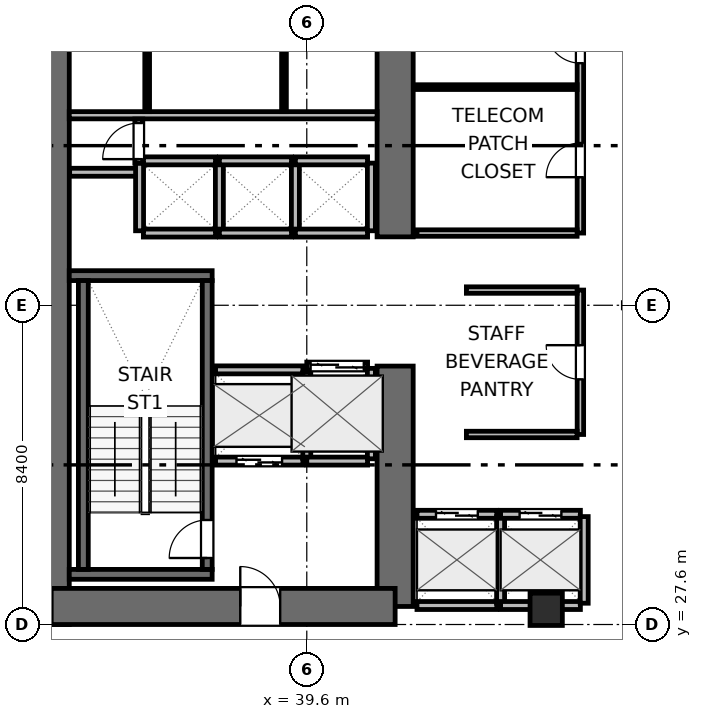
"""IFC4 building model, lengths in metres.
Left out: names, types, materials, properties, quantities, classifications, styles, units other than length and angle.
Written with IfcOpenShell. Run it as: python <this file> out.ifc"""

import sys

from ifc_helpers import new_model, si_unit, direction, frame, frame_2d, origin, origin_2d, place, context, subcontext, project, spatial, rectangle, extrude, element, fill, save


model = new_model("IFC4")
c1 = context("Model", 3, precision=1e-05, world=origin(), true_north=direction((0.0, 1.0)))
c2 = subcontext(c1, "Body", "Model", "MODEL_VIEW")
j1 = project(units=[si_unit("LENGTHUNIT", "METRE"), si_unit("PLANEANGLEUNIT", "RADIAN")], contexts=[c1])
p1 = place(None, origin())
s1 = spatial("IfcSite", under=j1, at=p1, CompositionType="ELEMENT")
p2 = place(p1, origin())
s2 = spatial("IfcBuilding", under=s1, at=p2, CompositionType="ELEMENT")
p3 = place(p2, frame((0.0, 0.0, 21.6)))
s3 = spatial("IfcBuildingStorey", under=s2, at=p3, CompositionType="ELEMENT", Elevation=21.6)
p4 = place(p3, frame((32.875, 27.6, 0.0), z_axis=(0.0, 0.0, 1.0), x_axis=(0.0, 1.0, 0.0)))
e1 = element("IfcWall", 1, at=p4, inside=s3, PredefinedType="SHEAR", context=c2, shape_type="SweptSolid", body=[
    extrude(rectangle(XDim=16.8, YDim=0.95, at=frame_2d((8.4, 0.0))), origin(), (0.0, 0.0, 1.0), 3.9),
])
p5 = place(p3, frame((41.925, 28.075, 0.0), z_axis=(0.0, 0.0, 1.0), x_axis=(0.0, 1.0, 0.0)))
e2 = element("IfcWall", 2, at=p5, inside=s3, PredefinedType="SHEAR", context=c2, shape_type="SweptSolid", body=[
    extrude(rectangle(XDim=6.325, YDim=0.95, at=frame_2d((3.163, 0.0))), origin(), (0.0, 0.0, 1.0), 3.9),
])
p6 = place(p3, frame((41.925, 37.8, 0.0), z_axis=(0.0, 0.0, 1.0), x_axis=(0.0, 1.0, 0.0)))
e3 = element("IfcWall", 3, at=p6, inside=s3, PredefinedType="SHEAR", context=c2, shape_type="SweptSolid", body=[
    extrude(rectangle(XDim=6.125, YDim=0.95, at=frame_2d((3.062, 0.0))), origin(), (0.0, 0.0, 1.0), 3.9),
])
p7 = place(p3, frame((32.875, 28.075, 0.0), z_axis=(0.0, 0.0, 1.0), x_axis=(1.0, 0.0, 0.0)))
e4 = element("IfcWall", 4, at=p7, inside=s3, PredefinedType="SHEAR", context=c2, shape_type="SweptSolid", body=[
    extrude(rectangle(XDim=9.05, YDim=0.95, at=frame_2d((4.525, 0.0))), origin(), (0.0, 0.0, 1.0), 3.9),
])
p8 = place(p7, frame((4.975, 0.0, 0.0)))
e5 = element("IfcOpeningElement", 5, at=p8, cuts=e4, PredefinedType="OPENING", context=c2, shape_type="SweptSolid", body=[
    extrude(rectangle(XDim=1.05, YDim=2.04, at=frame_2d((0.525, 1.02))), frame((0.0, 0.485, 0.0), z_axis=(0.0, -1.0, 0.0), x_axis=(1.0, 0.0, 0.0)), (0.0, 0.0, 1.0), 0.97),
])
for number, where, z_axis, x_axis in (
    (6, (33.35, 28.92, 0.0), (0.0, 0.0, 1.0), (1.0, 0.0, 0.0)),
    (7, (33.35, 36.78, 0.0), (0.0, 0.0, 1.0), (1.0, 0.0, 0.0)),
):
    element("IfcWall", number, at=place(p3, frame(where, z_axis=z_axis, x_axis=x_axis)), inside=s3, PredefinedType="SHEAR", context=c2, shape_type="SweptSolid", body=[
        extrude(rectangle(XDim=3.76, YDim=0.26, at=frame_2d((1.88, 0.0))), origin(), (0.0, 0.0, 1.0), 3.9),
    ])
p9 = place(p3, frame((33.72, 29.05, 0.0), z_axis=(0.0, 0.0, 1.0), x_axis=(0.0, 1.0, 0.0)))
e8 = element("IfcWall", 8, at=p9, inside=s3, PredefinedType="SHEAR", context=c2, shape_type="SweptSolid", body=[
    extrude(rectangle(XDim=7.6, YDim=0.26, at=frame_2d((3.8, 0.0))), origin(), (0.0, 0.0, 1.0), 3.9),
])
p10 = place(p3, frame((36.98, 29.05, 0.0), z_axis=(0.0, 0.0, 1.0), x_axis=(0.0, 1.0, 0.0)))
e9 = element("IfcWall", 9, at=p10, inside=s3, PredefinedType="SHEAR", context=c2, shape_type="SweptSolid", body=[
    extrude(rectangle(XDim=7.6, YDim=0.26, at=frame_2d((3.8, 0.0))), origin(), (0.0, 0.0, 1.0), 3.9),
])
p11 = place(p10, frame((0.3, 0.0, 0.0)))
e10 = element("IfcOpeningElement", 10, at=p11, cuts=e9, PredefinedType="OPENING", context=c2, shape_type="SweptSolid", body=[
    extrude(rectangle(XDim=1.0, YDim=2.04, at=frame_2d((0.5, 1.02))), frame((0.0, 0.14, 0.0), z_axis=(0.0, -1.0, 0.0), x_axis=(1.0, 0.0, 0.0)), (0.0, 0.0, 1.0), 0.28),
])
p12 = place(p3, frame((45.9, 28.0, 0.0), z_axis=(0.0, 0.0, 1.0), x_axis=(1.0, 0.0, 0.0)))
e11 = element("IfcColumn", 11, at=p12, inside=s3, PredefinedType="COLUMN", context=c2, shape_type="SweptSolid", body=[
    extrude(rectangle(XDim=0.85, YDim=0.85, at=origin_2d()), origin(), (0.0, 0.0, 1.0), 3.9),
])
p13 = place(p3, frame((33.35, 41.0, 0.0), z_axis=(0.0, 0.0, 1.0), x_axis=(1.0, 0.0, 0.0)))
e12 = element("IfcWall", 12, at=p13, inside=s3, PredefinedType="PLUMBINGWALL", context=c2, shape_type="SweptSolid", body=[
    extrude(rectangle(XDim=8.1, YDim=0.19, at=frame_2d((4.05, 0.0))), origin(), (0.0, 0.0, 1.0), 3.64),
])
for number, where, z_axis, x_axis in (
    (13, (35.4, 41.095, 0.0), (0.0, 0.0, 1.0), (0.0, 1.0, 0.0)),
    (14, (39.0, 41.095, 0.0), (0.0, 0.0, 1.0), (0.0, 1.0, 0.0)),
):
    element("IfcWall", number, at=place(p3, frame(where, z_axis=z_axis, x_axis=x_axis)), inside=s3, PredefinedType="PARTITIONING", context=c2, shape_type="SweptSolid", body=[
        extrude(rectangle(XDim=2.355, YDim=0.125, at=frame_2d((1.177, 0.0))), origin(), (0.0, 0.0, 1.0), 3.64),
    ])
p14 = place(p3, frame((33.36, 39.5, 0.0), z_axis=(0.0, 0.0, 1.0), x_axis=(1.0, 0.0, 0.0)))
e15 = element("IfcWall", 15, at=p14, inside=s3, PredefinedType="PARTITIONING", context=c2, shape_type="SweptSolid", body=[
    extrude(rectangle(XDim=1.86, YDim=0.21, at=frame_2d((0.93, 0.0))), origin(), (0.0, 0.0, 1.0), 3.64),
])
p15 = place(p3, frame((37.2, 31.9, 0.0), z_axis=(0.0, 0.0, 1.0), x_axis=(1.0, 0.0, 0.0)))
e16 = element("IfcWall", 16, at=p15, inside=s3, PredefinedType="PARTITIONING", context=c2, shape_type="SweptSolid", body=[
    extrude(rectangle(XDim=2.3, YDim=0.21, at=frame_2d((1.15, 0.0))), origin(), (0.0, 0.0, 1.0), 3.64),
])
p16 = place(p15, frame((0.55, 0.0, 0.0)))
e17 = element("IfcOpeningElement", 17, at=p16, cuts=e16, PredefinedType="OPENING", context=c2, shape_type="SweptSolid", body=[
    extrude(rectangle(XDim=1.2, YDim=2.04, at=frame_2d((0.6, 1.02))), frame((0.0, 0.115, 0.0), z_axis=(0.0, -1.0, 0.0), x_axis=(1.0, 0.0, 0.0)), (0.0, 0.0, 1.0), 0.23),
])
p17 = place(p3, frame((37.2, 34.3, 0.0), z_axis=(0.0, 0.0, 1.0), x_axis=(1.0, 0.0, 0.0)))
e18 = element("IfcWall", 18, at=p17, inside=s3, PredefinedType="PARTITIONING", context=c2, shape_type="SweptSolid", body=[
    extrude(rectangle(XDim=2.3, YDim=0.21, at=frame_2d((1.15, 0.0))), origin(), (0.0, 0.0, 1.0), 3.64),
])
p18 = place(p3, frame((39.6, 31.96, 0.0), z_axis=(0.0, 0.0, 1.0), x_axis=(0.0, 1.0, 0.0)))
e19 = element("IfcWall", 19, at=p18, inside=s3, PredefinedType="PARTITIONING", context=c2, shape_type="SweptSolid", body=[
    extrude(rectangle(XDim=2.28, YDim=0.21, at=frame_2d((1.14, 0.0))), origin(), (0.0, 0.0, 1.0), 3.64),
])
p19 = place(p3, frame((39.6, 34.4, 0.0), z_axis=(0.0, 0.0, 1.0), x_axis=(1.0, 0.0, 0.0)))
e20 = element("IfcWall", 20, at=p19, inside=s3, PredefinedType="PARTITIONING", context=c2, shape_type="SweptSolid", body=[
    extrude(rectangle(XDim=1.6, YDim=0.21, at=frame_2d((0.8, 0.0))), origin(), (0.0, 0.0, 1.0), 3.64),
])
p20 = place(p19, frame((0.1, 0.0, 0.0)))
e21 = element("IfcOpeningElement", 21, at=p20, cuts=e20, PredefinedType="OPENING", context=c2, shape_type="SweptSolid", body=[
    extrude(rectangle(XDim=1.4, YDim=2.06, at=frame_2d((0.7, 1.03))), frame((0.0, 0.115, 0.0), z_axis=(0.0, -1.0, 0.0), x_axis=(1.0, 0.0, 0.0)), (0.0, 0.0, 1.0), 0.23),
])
p21 = place(p3, frame((39.6, 31.9, 0.0), z_axis=(0.0, 0.0, 1.0), x_axis=(1.0, 0.0, 0.0)))
e22 = element("IfcWall", 22, at=p21, inside=s3, PredefinedType="PARTITIONING", context=c2, shape_type="SweptSolid", body=[
    extrude(rectangle(XDim=1.6, YDim=0.21, at=frame_2d((0.8, 0.0))), origin(), (0.0, 0.0, 1.0), 3.64),
])
p22 = place(p3, frame((41.3, 31.96, 0.0), z_axis=(0.0, 0.0, 1.0), x_axis=(0.0, 1.0, 0.0)))
e23 = element("IfcWall", 23, at=p22, inside=s3, PredefinedType="PARTITIONING", context=c2, shape_type="SweptSolid", body=[
    extrude(rectangle(XDim=2.38, YDim=0.21, at=frame_2d((1.19, 0.0))), origin(), (0.0, 0.0, 1.0), 3.64),
])
p23 = place(p3, frame((42.5, 30.5, 0.0), z_axis=(0.0, 0.0, 1.0), x_axis=(1.0, 0.0, 0.0)))
e24 = element("IfcWall", 24, at=p23, inside=s3, PredefinedType="PARTITIONING", context=c2, shape_type="SweptSolid", body=[
    extrude(rectangle(XDim=2.1, YDim=0.21, at=frame_2d((1.05, 0.0))), origin(), (0.0, 0.0, 1.0), 3.64),
])
p24 = place(p23, frame((0.5, 0.0, 0.0)))
e25 = element("IfcOpeningElement", 25, at=p24, cuts=e24, PredefinedType="OPENING", context=c2, shape_type="SweptSolid", body=[
    extrude(rectangle(XDim=1.1, YDim=2.04, at=frame_2d((0.55, 1.02))), frame((0.0, 0.115, 0.0), z_axis=(0.0, -1.0, 0.0), x_axis=(1.0, 0.0, 0.0)), (0.0, 0.0, 1.0), 0.23),
])
p25 = place(p3, frame((42.5, 28.1, 0.0), z_axis=(0.0, 0.0, 1.0), x_axis=(1.0, 0.0, 0.0)))
e26 = element("IfcWall", 26, at=p25, inside=s3, PredefinedType="PARTITIONING", context=c2, shape_type="SweptSolid", body=[
    extrude(rectangle(XDim=2.1, YDim=0.21, at=frame_2d((1.05, 0.0))), origin(), (0.0, 0.0, 1.0), 2.525),
])
p26 = place(p3, frame((44.7, 28.16, 0.0), z_axis=(0.0, 0.0, 1.0), x_axis=(0.0, 1.0, 0.0)))
e27 = element("IfcWall", 27, at=p26, inside=s3, PredefinedType="PARTITIONING", context=c2, shape_type="SweptSolid", body=[
    extrude(rectangle(XDim=2.28, YDim=0.21, at=frame_2d((1.14, 0.0))), origin(), (0.0, 0.0, 1.0), 3.64),
])
p27 = place(p3, frame((44.7, 30.5, 0.0), z_axis=(0.0, 0.0, 1.0), x_axis=(1.0, 0.0, 0.0)))
e28 = element("IfcWall", 28, at=p27, inside=s3, PredefinedType="PARTITIONING", context=c2, shape_type="SweptSolid", body=[
    extrude(rectangle(XDim=2.1, YDim=0.21, at=frame_2d((1.05, 0.0))), origin(), (0.0, 0.0, 1.0), 3.64),
])
p28 = place(p27, frame((0.5, 0.0, 0.0)))
e29 = element("IfcOpeningElement", 29, at=p28, cuts=e28, PredefinedType="OPENING", context=c2, shape_type="SweptSolid", body=[
    extrude(rectangle(XDim=1.1, YDim=2.04, at=frame_2d((0.55, 1.02))), frame((0.0, 0.115, 0.0), z_axis=(0.0, -1.0, 0.0), x_axis=(1.0, 0.0, 0.0)), (0.0, 0.0, 1.0), 0.23),
])
p29 = place(p3, frame((44.7, 28.1, 0.0), z_axis=(0.0, 0.0, 1.0), x_axis=(1.0, 0.0, 0.0)))
e30 = element("IfcWall", 30, at=p29, inside=s3, PredefinedType="PARTITIONING", context=c2, shape_type="SweptSolid", body=[
    extrude(rectangle(XDim=2.1, YDim=0.21, at=frame_2d((1.05, 0.0))), origin(), (0.0, 0.0, 1.0), 2.525),
])
p30 = place(p3, frame((46.9, 28.16, 0.0), z_axis=(0.0, 0.0, 1.0), x_axis=(0.0, 1.0, 0.0)))
e31 = element("IfcWall", 31, at=p30, inside=s3, PredefinedType="PARTITIONING", context=c2, shape_type="SweptSolid", body=[
    extrude(rectangle(XDim=2.28, YDim=0.21, at=frame_2d((1.14, 0.0))), origin(), (0.0, 0.0, 1.0), 3.64),
])
for number, where, z_axis, x_axis in (
    (32, (35.3, 37.9, 0.0), (0.0, 0.0, 1.0), (1.0, 0.0, 0.0)),
    (33, (35.3, 39.8, 0.0), (0.0, 0.0, 1.0), (1.0, 0.0, 0.0)),
):
    element("IfcWall", number, at=place(p3, frame(where, z_axis=z_axis, x_axis=x_axis)), inside=s3, PredefinedType="PARTITIONING", context=c2, shape_type="SweptSolid", body=[
        extrude(rectangle(XDim=1.9, YDim=0.21, at=frame_2d((0.95, 0.0))), origin(), (0.0, 0.0, 1.0), 3.64),
    ])
for number, where, z_axis, x_axis in (
    (34, (35.2, 37.96, 0.0), (0.0, 0.0, 1.0), (0.0, 1.0, 0.0)),
    (35, (37.3, 37.96, 0.0), (0.0, 0.0, 1.0), (0.0, 1.0, 0.0)),
):
    element("IfcWall", number, at=place(p3, frame(where, z_axis=z_axis, x_axis=x_axis)), inside=s3, PredefinedType="PARTITIONING", context=c2, shape_type="SweptSolid", body=[
        extrude(rectangle(XDim=1.78, YDim=0.21, at=frame_2d((0.89, 0.0))), origin(), (0.0, 0.0, 1.0), 3.64),
    ])
for number, where, z_axis, x_axis in (
    (36, (37.3, 37.9, 0.0), (0.0, 0.0, 1.0), (1.0, 0.0, 0.0)),
    (37, (37.3, 39.8, 0.0), (0.0, 0.0, 1.0), (1.0, 0.0, 0.0)),
):
    element("IfcWall", number, at=place(p3, frame(where, z_axis=z_axis, x_axis=x_axis)), inside=s3, PredefinedType="PARTITIONING", context=c2, shape_type="SweptSolid", body=[
        extrude(rectangle(XDim=1.9, YDim=0.21, at=frame_2d((0.95, 0.0))), origin(), (0.0, 0.0, 1.0), 3.64),
    ])
p31 = place(p3, frame((39.3, 37.96, 0.0), z_axis=(0.0, 0.0, 1.0), x_axis=(0.0, 1.0, 0.0)))
e38 = element("IfcWall", 38, at=p31, inside=s3, PredefinedType="PARTITIONING", context=c2, shape_type="SweptSolid", body=[
    extrude(rectangle(XDim=1.78, YDim=0.21, at=frame_2d((0.89, 0.0))), origin(), (0.0, 0.0, 1.0), 3.64),
])
for number, where, z_axis, x_axis in (
    (39, (39.3, 37.9, 0.0), (0.0, 0.0, 1.0), (1.0, 0.0, 0.0)),
    (40, (39.3, 39.8, 0.0), (0.0, 0.0, 1.0), (1.0, 0.0, 0.0)),
):
    element("IfcWall", number, at=place(p3, frame(where, z_axis=z_axis, x_axis=x_axis)), inside=s3, PredefinedType="PARTITIONING", context=c2, shape_type="SweptSolid", body=[
        extrude(rectangle(XDim=1.9, YDim=0.21, at=frame_2d((0.95, 0.0))), origin(), (0.0, 0.0, 1.0), 3.64),
    ])
p32 = place(p3, frame((41.3, 37.96, 0.0), z_axis=(0.0, 0.0, 1.0), x_axis=(0.0, 1.0, 0.0)))
e41 = element("IfcWall", 41, at=p32, inside=s3, PredefinedType="PARTITIONING", context=c2, shape_type="SweptSolid", body=[
    extrude(rectangle(XDim=1.78, YDim=0.21, at=frame_2d((0.89, 0.0))), origin(), (0.0, 0.0, 1.0), 3.64),
])
p33 = place(p3, frame((35.18, 39.74, 0.0), z_axis=(0.0, 0.0, 1.0), x_axis=(0.0, 1.0, 0.0)))
e42 = element("IfcWall", 42, at=p33, inside=s3, PredefinedType="PARTITIONING", context=c2, shape_type="SweptSolid", body=[
    extrude(rectangle(XDim=1.16, YDim=0.21, at=frame_2d((0.58, 0.0))), origin(), (0.0, 0.0, 1.0), 3.64),
])
p34 = place(p33, frame((0.105, 0.0, 0.0)))
e43 = element("IfcOpeningElement", 43, at=p34, cuts=e42, PredefinedType="OPENING", context=c2, shape_type="SweptSolid", body=[
    extrude(rectangle(XDim=0.95, YDim=2.04, at=frame_2d((0.475, 1.02))), frame((0.0, 0.115, 0.0), z_axis=(0.0, -1.0, 0.0), x_axis=(1.0, 0.0, 0.0)), (0.0, 0.0, 1.0), 0.23),
])
p35 = place(p3, frame((46.8, 32.6, 0.0), z_axis=(0.0, 0.0, 1.0), x_axis=(0.0, 1.0, 0.0)))
e44 = element("IfcWall", 44, at=p35, inside=s3, PredefinedType="PARTITIONING", context=c2, shape_type="SweptSolid", body=[
    extrude(rectangle(XDim=3.8, YDim=0.17, at=frame_2d((1.9, 0.0))), origin(), (0.0, 0.0, 1.0), 3.64),
])
p36 = place(p35, frame((1.45, 0.0, 0.0)))
e45 = element("IfcOpeningElement", 45, at=p36, cuts=e44, PredefinedType="OPENING", context=c2, shape_type="SweptSolid", body=[
    extrude(rectangle(XDim=0.9, YDim=2.02, at=frame_2d((0.45, 1.01))), frame((0.0, 0.095, 0.0), z_axis=(0.0, -1.0, 0.0), x_axis=(1.0, 0.0, 0.0)), (0.0, 0.0, 1.0), 0.19),
])
for number, where, z_axis, x_axis in (
    (46, (43.8, 32.6, 0.0), (0.0, 0.0, 1.0), (1.0, 0.0, 0.0)),
    (47, (43.8, 36.4, 0.0), (0.0, 0.0, 1.0), (1.0, 0.0, 0.0)),
):
    element("IfcWall", number, at=place(p3, frame(where, z_axis=z_axis, x_axis=x_axis)), inside=s3, PredefinedType="PARTITIONING", context=c2, shape_type="SweptSolid", body=[
        extrude(rectangle(XDim=2.913, YDim=0.17, at=frame_2d((1.457, 0.0))), origin(), (0.0, 0.0, 1.0), 3.64),
    ])
p37 = place(p3, frame((46.8, 37.9, 0.0), z_axis=(0.0, 0.0, 1.0), x_axis=(0.0, 1.0, 0.0)))
e48 = element("IfcWall", 48, at=p37, inside=s3, PredefinedType="PARTITIONING", context=c2, shape_type="SweptSolid", body=[
    extrude(rectangle(XDim=6.0, YDim=0.17, at=frame_2d((3.0, 0.0))), origin(), (0.0, 0.0, 1.0), 3.64),
])
p38 = place(p37, frame((1.47, 0.0, 0.0)))
e49 = element("IfcOpeningElement", 49, at=p38, cuts=e48, PredefinedType="OPENING", context=c2, shape_type="SweptSolid", body=[
    extrude(rectangle(XDim=0.9, YDim=2.02, at=frame_2d((0.45, 1.01))), frame((0.0, 0.095, 0.0), z_axis=(0.0, -1.0, 0.0), x_axis=(1.0, 0.0, 0.0)), (0.0, 0.0, 1.0), 0.19),
])
p39 = place(p37, frame((4.47, 0.0, 0.0)))
e50 = element("IfcOpeningElement", 50, at=p39, cuts=e48, PredefinedType="OPENING", context=c2, shape_type="SweptSolid", body=[
    extrude(rectangle(XDim=0.9, YDim=2.02, at=frame_2d((0.45, 1.01))), frame((0.0, 0.095, 0.0), z_axis=(0.0, -1.0, 0.0), x_axis=(1.0, 0.0, 0.0)), (0.0, 0.0, 1.0), 0.19),
])
p40 = place(p3, frame((42.5, 37.9, 0.0), z_axis=(0.0, 0.0, 1.0), x_axis=(1.0, 0.0, 0.0)))
e51 = element("IfcWall", 51, at=p40, inside=s3, PredefinedType="PARTITIONING", context=c2, shape_type="SweptSolid", body=[
    extrude(rectangle(XDim=4.213, YDim=0.17, at=frame_2d((2.106, 0.0))), origin(), (0.0, 0.0, 1.0), 3.64),
])
p41 = place(p3, frame((42.5, 41.74, 0.0), z_axis=(0.0, 0.0, 1.0), x_axis=(1.0, 0.0, 0.0)))
e52 = element("IfcWall", 52, at=p41, inside=s3, PredefinedType="PARTITIONING", context=c2, shape_type="SweptSolid", body=[
    extrude(rectangle(XDim=4.213, YDim=0.125, at=frame_2d((2.106, 0.0))), origin(), (0.0, 0.0, 1.0), 3.64),
])
p42 = place(p11, origin())
e53 = element("IfcDoor", 53, at=p42, inside=s3, OperationType="SINGLE_SWING_LEFT", PredefinedType="DOOR", context=c2, shape_type="SweptSolid", body=[
    extrude(rectangle(XDim=1.0, YDim=2.04, at=frame_2d((0.5, 1.02))), frame((0.0, 0.025, 0.0), z_axis=(0.0, -1.0, 0.0), x_axis=(1.0, 0.0, 0.0)), (0.0, 0.0, 1.0), 0.05),
])
fill(e10, e53)
p43 = place(p16, origin())
e54 = element("IfcDoor", 54, at=p43, inside=s3, OperationType="DOUBLE_DOOR_SLIDING", PredefinedType="DOOR", context=c2, shape_type="SweptSolid", body=[
    extrude(rectangle(XDim=1.2, YDim=2.04, at=frame_2d((0.6, 1.02))), frame((0.0, 0.025, 0.0), z_axis=(0.0, -1.0, 0.0), x_axis=(1.0, 0.0, 0.0)), (0.0, 0.0, 1.0), 0.05),
])
fill(e17, e54)
p44 = place(p20, origin())
e55 = element("IfcDoor", 55, at=p44, inside=s3, OperationType="DOUBLE_DOOR_SLIDING", PredefinedType="DOOR", context=c2, shape_type="SweptSolid", body=[
    extrude(rectangle(XDim=1.4, YDim=2.06, at=frame_2d((0.7, 1.03))), frame((0.0, 0.025, 0.0), z_axis=(0.0, -1.0, 0.0), x_axis=(1.0, 0.0, 0.0)), (0.0, 0.0, 1.0), 0.05),
])
fill(e21, e55)
p45 = place(p24, origin())
e56 = element("IfcDoor", 56, at=p45, inside=s3, OperationType="DOUBLE_DOOR_SLIDING", PredefinedType="DOOR", context=c2, shape_type="SweptSolid", body=[
    extrude(rectangle(XDim=1.1, YDim=2.04, at=frame_2d((0.55, 1.02))), frame((0.0, 0.025, 0.0), z_axis=(0.0, -1.0, 0.0), x_axis=(1.0, 0.0, 0.0)), (0.0, 0.0, 1.0), 0.05),
])
fill(e25, e56)
p46 = place(p28, origin())
e57 = element("IfcDoor", 57, at=p46, inside=s3, OperationType="DOUBLE_DOOR_SLIDING", PredefinedType="DOOR", context=c2, shape_type="SweptSolid", body=[
    extrude(rectangle(XDim=1.1, YDim=2.04, at=frame_2d((0.55, 1.02))), frame((0.0, 0.025, 0.0), z_axis=(0.0, -1.0, 0.0), x_axis=(1.0, 0.0, 0.0)), (0.0, 0.0, 1.0), 0.05),
])
fill(e29, e57)
p47 = place(p8, origin())
e58 = element("IfcDoor", 58, at=p47, inside=s3, OperationType="SINGLE_SWING_LEFT", PredefinedType="DOOR", context=c2, shape_type="SweptSolid", body=[
    extrude(rectangle(XDim=1.05, YDim=2.04, at=frame_2d((0.525, 1.02))), frame((0.0, 0.025, 0.0), z_axis=(0.0, -1.0, 0.0), x_axis=(1.0, 0.0, 0.0)), (0.0, 0.0, 1.0), 0.05),
])
fill(e5, e58)
p48 = place(p34, origin())
e59 = element("IfcDoor", 59, at=p48, inside=s3, OperationType="SINGLE_SWING_LEFT", PredefinedType="DOOR", context=c2, shape_type="SweptSolid", body=[
    extrude(rectangle(XDim=0.95, YDim=2.04, at=frame_2d((0.475, 1.02))), frame((0.0, 0.025, 0.0), z_axis=(0.0, -1.0, 0.0), x_axis=(1.0, 0.0, 0.0)), (0.0, 0.0, 1.0), 0.05),
])
fill(e43, e59)
p49 = place(p36, origin())
e60 = element("IfcDoor", 60, at=p49, inside=s3, OperationType="SINGLE_SWING_RIGHT", PredefinedType="DOOR", context=c2, shape_type="SweptSolid", body=[
    extrude(rectangle(XDim=0.9, YDim=2.02, at=frame_2d((0.45, 1.01))), frame((0.0, 0.025, 0.0), z_axis=(0.0, -1.0, 0.0), x_axis=(1.0, 0.0, 0.0)), (0.0, 0.0, 1.0), 0.05),
])
fill(e45, e60)
p50 = place(p38, origin())
e61 = element("IfcDoor", 61, at=p50, inside=s3, OperationType="SINGLE_SWING_LEFT", PredefinedType="DOOR", context=c2, shape_type="SweptSolid", body=[
    extrude(rectangle(XDim=0.9, YDim=2.02, at=frame_2d((0.45, 1.01))), frame((0.0, 0.025, 0.0), z_axis=(0.0, -1.0, 0.0), x_axis=(1.0, 0.0, 0.0)), (0.0, 0.0, 1.0), 0.05),
])
fill(e49, e61)
p51 = place(p39, origin())
e62 = element("IfcDoor", 62, at=p51, inside=s3, OperationType="SINGLE_SWING_RIGHT", PredefinedType="DOOR", context=c2, shape_type="SweptSolid", body=[
    extrude(rectangle(XDim=0.9, YDim=2.02, at=frame_2d((0.45, 1.01))), frame((0.0, 0.025, 0.0), z_axis=(0.0, -1.0, 0.0), x_axis=(1.0, 0.0, 0.0)), (0.0, 0.0, 1.0), 0.05),
])
fill(e50, e62)
save(model, sys.argv[1])
